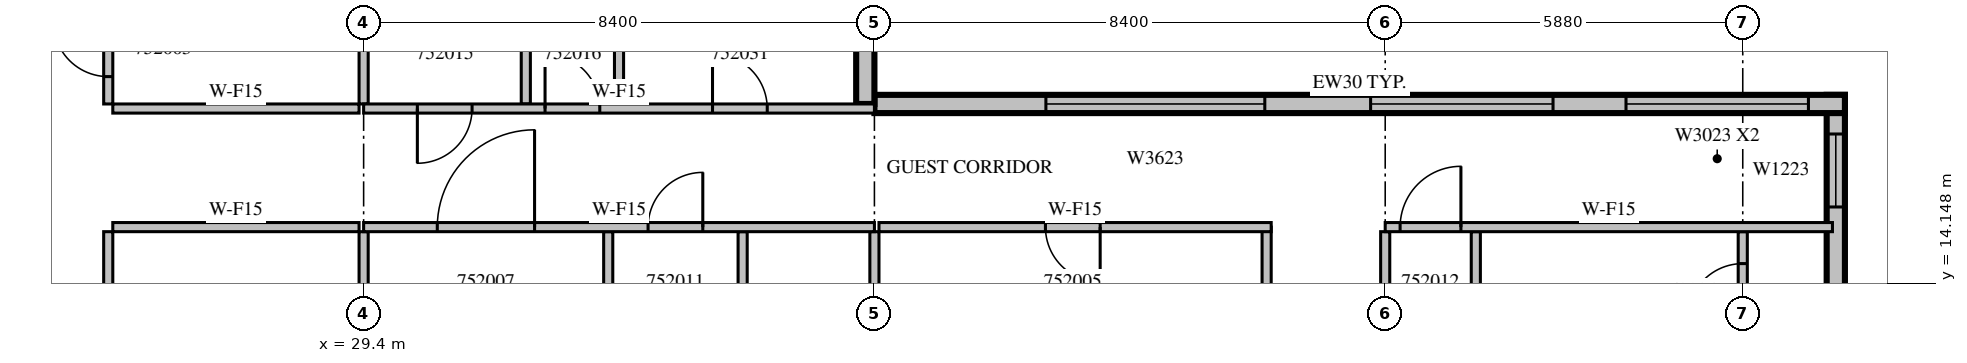
"""IFC4 building model, lengths in metres.
Left out: names, types, materials, properties, quantities, classifications, styles, units other than length and angle.
Written with IfcOpenShell. Run it as: python <this file> out.ifc"""

import sys

from ifc_helpers import new_model, si_unit, direction, frame, frame_2d, origin, place, context, subcontext, project, spatial, rectangle, extrude, source, transform, mapped, element, fill, save


model = new_model("IFC4")
c1 = context("Model", 3, precision=1e-05, world=origin(), true_north=direction((0.0, 1.0)))
c2 = subcontext(c1, "Body", "Model", "MODEL_VIEW")
j1 = project(units=[si_unit("LENGTHUNIT", "METRE"), si_unit("PLANEANGLEUNIT", "RADIAN")], contexts=[c1])
p1 = place(None, origin())
s1 = spatial("IfcSite", under=j1, at=p1, CompositionType="ELEMENT")
p2 = place(p1, origin())
s2 = spatial("IfcBuilding", under=s1, at=p2, CompositionType="ELEMENT")
p3 = place(p2, frame((0.0, 0.0, 231.0)))
s3 = spatial("IfcBuildingStorey", under=s2, at=p3, CompositionType="ELEMENT", Elevation=231.0)
m1 = source(origin(), c2, "Body", "SweptSolid", [
    extrude(rectangle(XDim=3.375, YDim=0.3, at=frame_2d((1.688, 0.0))), origin(), (0.0, 0.0, 1.0), 3.4),
])
p4 = place(p3, frame((53.61, 13.875, 0.0), z_axis=(0.0, 0.0, 1.0), x_axis=(0.0, 1.0, 0.0)))
e1 = element("IfcWall", 1, at=p4, inside=s3, PredefinedType="STANDARD", context=c2, shape_type="MappedRepresentation", body=[
    mapped(m1, transform((0.0, 0.0, 0.0), scale=1.0)),
])
m2 = source(origin(), c2, "Body", "SweptSolid", [
    extrude(rectangle(XDim=1.2, YDim=2.3, at=frame_2d((0.6, 1.15))), frame((0.0, 0.16, 0.0), z_axis=(0.0, -1.0, 0.0), x_axis=(1.0, 0.0, 0.0)), (0.0, 0.0, 1.0), 0.32),
])
p5 = place(p4, frame((1.531, 0.0, 0.6)))
e2 = element("IfcOpeningElement", 2, at=p5, cuts=e1, PredefinedType="OPENING", context=c2, shape_type="MappedRepresentation", body=[
    mapped(m2, transform((0.0, 0.0, 0.0), scale=1.0)),
])
m3 = source(origin(), c2, "Body", "SweptSolid", [
    extrude(rectangle(XDim=15.96, YDim=0.3, at=frame_2d((7.98, 0.0))), origin(), (0.0, 0.0, 1.0), 3.4),
])
p6 = place(p3, frame((53.76, 17.1, 0.0), z_axis=(0.0, 0.0, 1.0), x_axis=(-1.0, 0.0, 0.0)))
e3 = element("IfcWall", 3, at=p6, inside=s3, PredefinedType="STANDARD", context=c2, shape_type="MappedRepresentation", body=[
    mapped(m3, transform((0.0, 0.0, 0.0), scale=1.0)),
])
m4 = source(origin(), c2, "Body", "SweptSolid", [
    extrude(rectangle(XDim=3.0, YDim=2.3, at=frame_2d((1.5, 1.15))), frame((0.0, 0.16, 0.0), z_axis=(0.0, -1.0, 0.0), x_axis=(1.0, 0.0, 0.0)), (0.0, 0.0, 1.0), 0.32),
])
p7 = place(p6, frame((0.6, 0.0, 0.6)))
e4 = element("IfcOpeningElement", 4, at=p7, cuts=e3, PredefinedType="OPENING", context=c2, shape_type="MappedRepresentation", body=[
    mapped(m4, transform((0.0, 0.0, 0.0), scale=1.0)),
])
p8 = place(p6, frame((4.8, 0.0, 0.6)))
e5 = element("IfcOpeningElement", 5, at=p8, cuts=e3, PredefinedType="OPENING", context=c2, shape_type="MappedRepresentation", body=[
    mapped(m4, transform((0.0, 0.0, 0.0), scale=1.0)),
])
m5 = source(origin(), c2, "Body", "SweptSolid", [
    extrude(rectangle(XDim=3.6, YDim=2.3, at=frame_2d((1.8, 1.15))), frame((0.0, 0.16, 0.0), z_axis=(0.0, -1.0, 0.0), x_axis=(1.0, 0.0, 0.0)), (0.0, 0.0, 1.0), 0.32),
])
p9 = place(p6, frame((9.54, 0.0, 0.6)))
e6 = element("IfcOpeningElement", 6, at=p9, cuts=e3, PredefinedType="OPENING", context=c2, shape_type="MappedRepresentation", body=[
    mapped(m5, transform((0.0, 0.0, 0.0), scale=1.0)),
])
m6 = source(origin(), c2, "Body", "SweptSolid", [
    extrude(rectangle(XDim=3.1, YDim=0.3, at=frame_2d((1.55, 0.0))), origin(), (0.0, 0.0, 1.0), 3.4),
])
p10 = place(p3, frame((37.65, 17.1, 0.0), z_axis=(0.0, 0.0, 1.0), x_axis=(0.0, 1.0, 0.0)))
e7 = element("IfcWall", 7, at=p10, inside=s3, PredefinedType="STANDARD", context=c2, shape_type="MappedRepresentation", body=[
    mapped(m6, transform((0.0, 0.0, 0.0), scale=1.0)),
])
m7 = source(origin(), c2, "Body", "SweptSolid", [
    extrude(rectangle(XDim=1.8, YDim=2.3, at=frame_2d((0.9, 1.15))), frame((0.0, 0.16, 0.0), z_axis=(0.0, -1.0, 0.0), x_axis=(1.0, 0.0, 0.0)), (0.0, 0.0, 1.0), 0.32),
])
p11 = place(p10, frame((1.125, 0.0, 0.6)))
e8 = element("IfcOpeningElement", 8, at=p11, cuts=e7, PredefinedType="OPENING", context=c2, shape_type="MappedRepresentation", body=[
    mapped(m7, transform((0.0, 0.0, 0.0), scale=1.0)),
])
m8 = source(origin(), c2, "Body", "SweptSolid", [
    extrude(rectangle(XDim=11.525, YDim=0.15, at=frame_2d((5.763, 0.0))), origin(), (0.0, 0.0, 1.0), 3.4),
])
p12 = place(p3, frame((25.2, 15.0, 0.0), z_axis=(0.0, 0.0, 1.0), x_axis=(0.0, -1.0, 0.0)))
e9 = element("IfcWall", 9, at=p12, inside=s3, PredefinedType="PARTITIONING", context=c2, shape_type="MappedRepresentation", body=[
    mapped(m8, transform((0.0, 0.0, 0.0), scale=1.0)),
])
m9 = source(origin(), c2, "Body", "SweptSolid", [
    extrude(rectangle(XDim=0.9, YDim=2.1, at=frame_2d((0.45, 1.05))), frame((0.0, 0.085, 0.0), z_axis=(0.0, -1.0, 0.0), x_axis=(1.0, 0.0, 0.0)), (0.0, 0.0, 1.0), 0.17),
])
p13 = place(p12, frame((8.762, 0.0, 0.0)))
e10 = element("IfcOpeningElement", 10, at=p13, cuts=e9, PredefinedType="OPENING", context=c2, shape_type="MappedRepresentation", body=[
    mapped(m9, transform((0.0, 0.0, 0.0), scale=1.0)),
])
p14 = place(p12, frame((2.125, 0.0, 0.0)))
e11 = element("IfcOpeningElement", 11, at=p14, cuts=e9, PredefinedType="OPENING", context=c2, shape_type="MappedRepresentation", body=[
    mapped(m9, transform((0.0, 0.0, 0.0), scale=1.0)),
])
m10 = source(origin(), c2, "Body", "SweptSolid", [
    extrude(rectangle(XDim=3.6, YDim=0.15, at=frame_2d((1.8, 0.0))), origin(), (0.0, 0.0, 1.0), 3.4),
])
p15 = place(p3, frame((25.2, 20.7, 0.0), z_axis=(0.0, 0.0, 1.0), x_axis=(0.0, -1.0, 0.0)))
e12 = element("IfcWall", 12, at=p15, inside=s3, PredefinedType="PARTITIONING", context=c2, shape_type="MappedRepresentation", body=[
    mapped(m10, transform((0.0, 0.0, 0.0), scale=1.0)),
])
p16 = place(p15, frame((2.25, 0.0, 0.0)))
e13 = element("IfcOpeningElement", 13, at=p16, cuts=e12, PredefinedType="OPENING", context=c2, shape_type="MappedRepresentation", body=[
    mapped(m9, transform((0.0, 0.0, 0.0), scale=1.0)),
])
m11 = source(origin(), c2, "Body", "SweptSolid", [
    extrude(rectangle(XDim=4.05, YDim=0.15, at=frame_2d((2.025, 0.0))), origin(), (0.0, 0.0, 1.0), 3.4),
])
for number, where, z_axis, x_axis in (
    (14, (29.325, 15.075, 0.0), (0.0, 0.0, 1.0), (-1.0, 0.0, 0.0)),
    (15, (25.275, 17.025, 0.0), (0.0, 0.0, 1.0), (1.0, 0.0, 0.0)),
):
    element("IfcWall", number, at=place(p3, frame(where, z_axis=z_axis, x_axis=x_axis)), inside=s3, PredefinedType="PARTITIONING", context=c2, shape_type="MappedRepresentation", body=[
        mapped(m11, transform((0.0, 0.0, 0.0), scale=1.0)),
    ])
m12 = source(origin(), c2, "Body", "SweptSolid", [
    extrude(rectangle(XDim=4.101, YDim=0.15, at=frame_2d((2.05, 0.0))), origin(), (0.0, 0.0, 1.0), 3.4),
])
p17 = place(p3, frame((29.4, 10.899, 0.0), z_axis=(0.0, 0.0, 1.0), x_axis=(0.0, 1.0, 0.0)))
e16 = element("IfcWall", 16, at=p17, inside=s3, PredefinedType="PARTITIONING", context=c2, shape_type="MappedRepresentation", body=[
    mapped(m12, transform((0.0, 0.0, 0.0), scale=1.0)),
])
m13 = source(origin(), c2, "Body", "SweptSolid", [
    extrude(rectangle(XDim=3.101, YDim=0.15, at=frame_2d((1.55, 0.0))), origin(), (0.0, 0.0, 1.0), 3.4),
])
p18 = place(p3, frame((29.4, 17.1, 0.0), z_axis=(0.0, 0.0, 1.0), x_axis=(0.0, 1.0, 0.0)))
e17 = element("IfcWall", 17, at=p18, inside=s3, PredefinedType="PARTITIONING", context=c2, shape_type="MappedRepresentation", body=[
    mapped(m13, transform((0.0, 0.0, 0.0), scale=1.0)),
])
m14 = source(origin(), c2, "Body", "SweptSolid", [
    extrude(rectangle(XDim=2.775, YDim=0.15, at=frame_2d((1.387, 0.0))), origin(), (0.0, 0.0, 1.0), 3.4),
])
p19 = place(p3, frame((44.25, 12.3, 0.0), z_axis=(0.0, 0.0, 1.0), x_axis=(0.0, 1.0, 0.0)))
e18 = element("IfcWall", 18, at=p19, inside=s3, PredefinedType="PARTITIONING", context=c2, shape_type="MappedRepresentation", body=[
    mapped(m14, transform((0.0, 0.0, 0.0), scale=1.0)),
])
m15 = source(origin(), c2, "Body", "SweptSolid", [
    extrude(rectangle(XDim=6.45, YDim=0.15, at=frame_2d((3.225, 0.0))), origin(), (0.0, 0.0, 1.0), 3.4),
])
p20 = place(p3, frame((44.325, 15.075, 0.0), z_axis=(0.0, 0.0, 1.0), x_axis=(-1.0, 0.0, 0.0)))
e19 = element("IfcWall", 19, at=p20, inside=s3, PredefinedType="PARTITIONING", context=c2, shape_type="MappedRepresentation", body=[
    mapped(m15, transform((0.0, 0.0, 0.0), scale=1.0)),
])
p21 = place(p20, frame((2.812, 0.0, 0.0)))
e20 = element("IfcOpeningElement", 20, at=p21, cuts=e19, PredefinedType="OPENING", context=c2, shape_type="MappedRepresentation", body=[
    mapped(m9, transform((0.0, 0.0, 0.0), scale=1.0)),
])
m16 = source(origin(), c2, "Body", "SweptSolid", [
    extrude(rectangle(XDim=3.95, YDim=0.15, at=frame_2d((1.975, 0.0))), origin(), (0.0, 0.0, 1.0), 3.4),
])
for number, where, z_axis, x_axis in (
    (21, (33.422, 11.05, 0.0), (0.0, 0.0, 1.0), (0.0, 1.0, 0.0)),
    (22, (35.633, 11.05, 0.0), (0.0, 0.0, 1.0), (0.0, 1.0, 0.0)),
    (23, (37.8, 11.05, 0.0), (0.0, 0.0, 1.0), (0.0, 1.0, 0.0)),
    (24, (47.69, 11.05, 0.0), (0.0, 0.0, 1.0), (0.0, 1.0, 0.0)),
):
    element("IfcWall", number, at=place(p3, frame(where, z_axis=z_axis, x_axis=x_axis)), inside=s3, PredefinedType="PARTITIONING", context=c2, shape_type="MappedRepresentation", body=[
        mapped(m16, transform((0.0, 0.0, 0.0), scale=1.0)),
    ])
p22 = place(p3, frame((52.08, 11.05, 0.0), z_axis=(0.0, 0.0, 1.0), x_axis=(0.0, 1.0, 0.0)))
e25 = element("IfcWall", 25, at=p22, inside=s3, PredefinedType="PARTITIONING", context=c2, shape_type="MappedRepresentation", body=[
    mapped(m16, transform((0.0, 0.0, 0.0), scale=1.0)),
])
p23 = place(p22, frame((1.525, 0.0, 0.0)))
e26 = element("IfcOpeningElement", 26, at=p23, cuts=e25, PredefinedType="OPENING", context=c2, shape_type="MappedRepresentation", body=[
    mapped(m9, transform((0.0, 0.0, 0.0), scale=1.0)),
])
p24 = place(p22, frame((2.525, 0.0, 0.0)))
e27 = element("IfcOpeningElement", 27, at=p24, cuts=e25, PredefinedType="OPENING", context=c2, shape_type="MappedRepresentation", body=[
    mapped(m9, transform((0.0, 0.0, 0.0), scale=1.0)),
])
p25 = place(p22, frame((0.525, 0.0, 0.0)))
e28 = element("IfcOpeningElement", 28, at=p25, cuts=e25, PredefinedType="OPENING", context=c2, shape_type="MappedRepresentation", body=[
    mapped(m9, transform((0.0, 0.0, 0.0), scale=1.0)),
])
p26 = place(p3, frame((46.2, 11.05, 0.0), z_axis=(0.0, 0.0, 1.0), x_axis=(0.0, 1.0, 0.0)))
e29 = element("IfcWall", 29, at=p26, inside=s3, PredefinedType="PARTITIONING", context=c2, shape_type="MappedRepresentation", body=[
    mapped(m16, transform((0.0, 0.0, 0.0), scale=1.0)),
])
for number, where, z_axis, x_axis in (
    (30, (32.067, 20.7, 0.0), (0.0, 0.0, 1.0), (0.0, -1.0, 0.0)),
    (31, (33.6, 17.1, 0.0), (0.0, 0.0, 1.0), (0.0, 1.0, 0.0)),
):
    element("IfcWall", number, at=place(p3, frame(where, z_axis=z_axis, x_axis=x_axis)), inside=s3, PredefinedType="PARTITIONING", context=c2, shape_type="MappedRepresentation", body=[
        mapped(m10, transform((0.0, 0.0, 0.0), scale=1.0)),
    ])
m17 = source(origin(), c2, "Body", "SweptSolid", [
    extrude(rectangle(XDim=8.4, YDim=0.15, at=frame_2d((4.2, 0.0))), origin(), (0.0, 0.0, 1.0), 3.4),
])
p27 = place(p3, frame((37.8, 15.075, 0.0), z_axis=(0.0, 0.0, 1.0), x_axis=(-1.0, 0.0, 0.0)))
e32 = element("IfcWall", 32, at=p27, inside=s3, PredefinedType="PARTITIONING", context=c2, shape_type="MappedRepresentation", body=[
    mapped(m17, transform((0.0, 0.0, 0.0), scale=1.0)),
])
m18 = source(origin(), c2, "Body", "SweptSolid", [
    extrude(rectangle(XDim=1.6, YDim=2.1, at=frame_2d((0.8, 1.05))), frame((0.0, 0.085, 0.0), z_axis=(0.0, -1.0, 0.0), x_axis=(1.0, 0.0, 0.0)), (0.0, 0.0, 1.0), 0.17),
])
p28 = place(p27, frame((5.589, 0.0, 0.0)))
e33 = element("IfcOpeningElement", 33, at=p28, cuts=e32, PredefinedType="OPENING", context=c2, shape_type="MappedRepresentation", body=[
    mapped(m18, transform((0.0, 0.0, 0.0), scale=1.0)),
])
p29 = place(p27, frame((2.822, 0.0, 0.0)))
e34 = element("IfcOpeningElement", 34, at=p29, cuts=e32, PredefinedType="OPENING", context=c2, shape_type="MappedRepresentation", body=[
    mapped(m9, transform((0.0, 0.0, 0.0), scale=1.0)),
])
m19 = source(origin(), c2, "Body", "SweptSolid", [
    extrude(rectangle(XDim=7.355, YDim=0.15, at=frame_2d((3.678, 0.0))), origin(), (0.0, 0.0, 1.0), 3.4),
])
p30 = place(p3, frame((53.555, 15.075, 0.0), z_axis=(0.0, 0.0, 1.0), x_axis=(-1.0, 0.0, 0.0)))
e35 = element("IfcWall", 35, at=p30, inside=s3, PredefinedType="PARTITIONING", context=c2, shape_type="MappedRepresentation", body=[
    mapped(m19, transform((0.0, 0.0, 0.0), scale=1.0)),
])
m20 = source(origin(), c2, "Body", "SweptSolid", [
    extrude(rectangle(XDim=1.0, YDim=2.1, at=frame_2d((0.5, 1.05))), frame((0.0, 0.085, 0.0), z_axis=(0.0, -1.0, 0.0), x_axis=(1.0, 0.0, 0.0)), (0.0, 0.0, 1.0), 0.17),
])
p31 = place(p30, frame((6.11, 0.0, 0.0)))
e36 = element("IfcOpeningElement", 36, at=p31, cuts=e35, PredefinedType="OPENING", context=c2, shape_type="MappedRepresentation", body=[
    mapped(m20, transform((0.0, 0.0, 0.0), scale=1.0)),
])
p32 = place(p3, frame((29.4, 17.025, 0.0), z_axis=(0.0, 0.0, 1.0), x_axis=(1.0, 0.0, 0.0)))
e37 = element("IfcWall", 37, at=p32, inside=s3, PredefinedType="PARTITIONING", context=c2, shape_type="MappedRepresentation", body=[
    mapped(m17, transform((0.0, 0.0, 0.0), scale=1.0)),
])
p33 = place(p32, frame((0.883, 0.0, 0.0)))
e38 = element("IfcOpeningElement", 38, at=p33, cuts=e37, PredefinedType="OPENING", context=c2, shape_type="MappedRepresentation", body=[
    mapped(m9, transform((0.0, 0.0, 0.0), scale=1.0)),
])
p34 = place(p32, frame((2.983, 0.0, 0.0)))
e39 = element("IfcOpeningElement", 39, at=p34, cuts=e37, PredefinedType="OPENING", context=c2, shape_type="MappedRepresentation", body=[
    mapped(m9, transform((0.0, 0.0, 0.0), scale=1.0)),
])
p35 = place(p32, frame((5.737, 0.0, 0.0)))
e40 = element("IfcOpeningElement", 40, at=p35, cuts=e37, PredefinedType="OPENING", context=c2, shape_type="MappedRepresentation", body=[
    mapped(m9, transform((0.0, 0.0, 0.0), scale=1.0)),
])
m21 = source(origin(), c2, "Body", "SweptSolid", [
    extrude(rectangle(XDim=1.2, YDim=2.3, at=frame_2d((0.6, 1.15))), frame((0.0, 0.03, 0.0), z_axis=(0.0, -1.0, 0.0), x_axis=(1.0, 0.0, 0.0)), (0.0, 0.0, 1.0), 0.06),
])
p36 = place(p5, origin())
e41 = element("IfcWindow", 41, at=p36, inside=s3, PartitioningType="SINGLE_PANEL", PredefinedType="WINDOW", context=c2, shape_type="MappedRepresentation", body=[
    mapped(m21, transform((0.0, 0.0, 0.0), scale=1.0)),
])
fill(e2, e41)
m22 = source(origin(), c2, "Body", "SweptSolid", [
    extrude(rectangle(XDim=3.0, YDim=2.3, at=frame_2d((1.5, 1.15))), frame((0.0, 0.03, 0.0), z_axis=(0.0, -1.0, 0.0), x_axis=(1.0, 0.0, 0.0)), (0.0, 0.0, 1.0), 0.06),
])
p37 = place(p7, origin())
e42 = element("IfcWindow", 42, at=p37, inside=s3, PartitioningType="SINGLE_PANEL", PredefinedType="WINDOW", context=c2, shape_type="MappedRepresentation", body=[
    mapped(m22, transform((0.0, 0.0, 0.0), scale=1.0)),
])
fill(e4, e42)
p38 = place(p8, origin())
e43 = element("IfcWindow", 43, at=p38, inside=s3, PartitioningType="SINGLE_PANEL", PredefinedType="WINDOW", context=c2, shape_type="MappedRepresentation", body=[
    mapped(m22, transform((0.0, 0.0, 0.0), scale=1.0)),
])
fill(e5, e43)
m23 = source(origin(), c2, "Body", "SweptSolid", [
    extrude(rectangle(XDim=3.6, YDim=2.3, at=frame_2d((1.8, 1.15))), frame((0.0, 0.03, 0.0), z_axis=(0.0, -1.0, 0.0), x_axis=(1.0, 0.0, 0.0)), (0.0, 0.0, 1.0), 0.06),
])
p39 = place(p9, origin())
e44 = element("IfcWindow", 44, at=p39, inside=s3, PartitioningType="SINGLE_PANEL", PredefinedType="WINDOW", context=c2, shape_type="MappedRepresentation", body=[
    mapped(m23, transform((0.0, 0.0, 0.0), scale=1.0)),
])
fill(e6, e44)
m24 = source(origin(), c2, "Body", "SweptSolid", [
    extrude(rectangle(XDim=0.9, YDim=2.1, at=frame_2d((0.45, 1.05))), frame((0.0, 0.025, 0.0), z_axis=(0.0, -1.0, 0.0), x_axis=(1.0, 0.0, 0.0)), (0.0, 0.0, 1.0), 0.05),
])
p40 = place(p16, origin())
e45 = element("IfcDoor", 45, at=p40, inside=s3, OperationType="SINGLE_SWING_RIGHT", PredefinedType="DOOR", context=c2, shape_type="MappedRepresentation", body=[
    mapped(m24, transform((0.0, 0.0, 0.0), scale=1.0)),
])
fill(e13, e45)
p41 = place(p21, origin())
e46 = element("IfcDoor", 46, at=p41, inside=s3, OperationType="SINGLE_SWING_LEFT", PredefinedType="DOOR", context=c2, shape_type="MappedRepresentation", body=[
    mapped(m24, transform((0.0, 0.0, 0.0), scale=1.0)),
])
fill(e20, e46)
m25 = source(origin(), c2, "Body", "SweptSolid", [
    extrude(rectangle(XDim=1.6, YDim=2.1, at=frame_2d((0.8, 1.05))), frame((0.0, 0.025, 0.0), z_axis=(0.0, -1.0, 0.0), x_axis=(1.0, 0.0, 0.0)), (0.0, 0.0, 1.0), 0.05),
])
p42 = place(p28, origin())
e47 = element("IfcDoor", 47, at=p42, inside=s3, OperationType="SINGLE_SWING_RIGHT", PredefinedType="DOOR", context=c2, shape_type="MappedRepresentation", body=[
    mapped(m25, transform((0.0, 0.0, 0.0), scale=1.0)),
])
fill(e33, e47)
p43 = place(p29, origin())
e48 = element("IfcDoor", 48, at=p43, inside=s3, OperationType="SINGLE_SWING_RIGHT", PredefinedType="DOOR", context=c2, shape_type="MappedRepresentation", body=[
    mapped(m24, transform((0.0, 0.0, 0.0), scale=1.0)),
])
fill(e34, e48)
m26 = source(origin(), c2, "Body", "SweptSolid", [
    extrude(rectangle(XDim=1.0, YDim=2.1, at=frame_2d((0.5, 1.05))), frame((0.0, 0.025, 0.0), z_axis=(0.0, -1.0, 0.0), x_axis=(1.0, 0.0, 0.0)), (0.0, 0.0, 1.0), 0.05),
])
p44 = place(p31, origin())
e49 = element("IfcDoor", 49, at=p44, inside=s3, OperationType="SINGLE_SWING_RIGHT", PredefinedType="DOOR", context=c2, shape_type="MappedRepresentation", body=[
    mapped(m26, transform((0.0, 0.0, 0.0), scale=1.0)),
])
fill(e36, e49)
p45 = place(p33, origin())
e50 = element("IfcDoor", 50, at=p45, inside=s3, OperationType="SINGLE_SWING_RIGHT", PredefinedType="DOOR", context=c2, shape_type="MappedRepresentation", body=[
    mapped(m24, transform((0.0, 0.0, 0.0), scale=1.0)),
])
fill(e38, e50)
p46 = place(p34, origin())
e51 = element("IfcDoor", 51, at=p46, inside=s3, OperationType="SINGLE_SWING_LEFT", PredefinedType="DOOR", context=c2, shape_type="MappedRepresentation", body=[
    mapped(m24, transform((0.0, 0.0, 0.0), scale=1.0)),
])
fill(e39, e51)
p47 = place(p35, origin())
e52 = element("IfcDoor", 52, at=p47, inside=s3, OperationType="SINGLE_SWING_LEFT", PredefinedType="DOOR", context=c2, shape_type="MappedRepresentation", body=[
    mapped(m24, transform((0.0, 0.0, 0.0), scale=1.0)),
])
fill(e40, e52)
p48 = place(p24, origin())
e53 = element("IfcDoor", 53, at=p48, inside=s3, OperationType="SINGLE_SWING_LEFT", PredefinedType="DOOR", context=c2, shape_type="MappedRepresentation", body=[
    mapped(m24, transform((0.0, 0.0, 0.0), scale=1.0)),
])
fill(e27, e53)
save(model, sys.argv[1])
